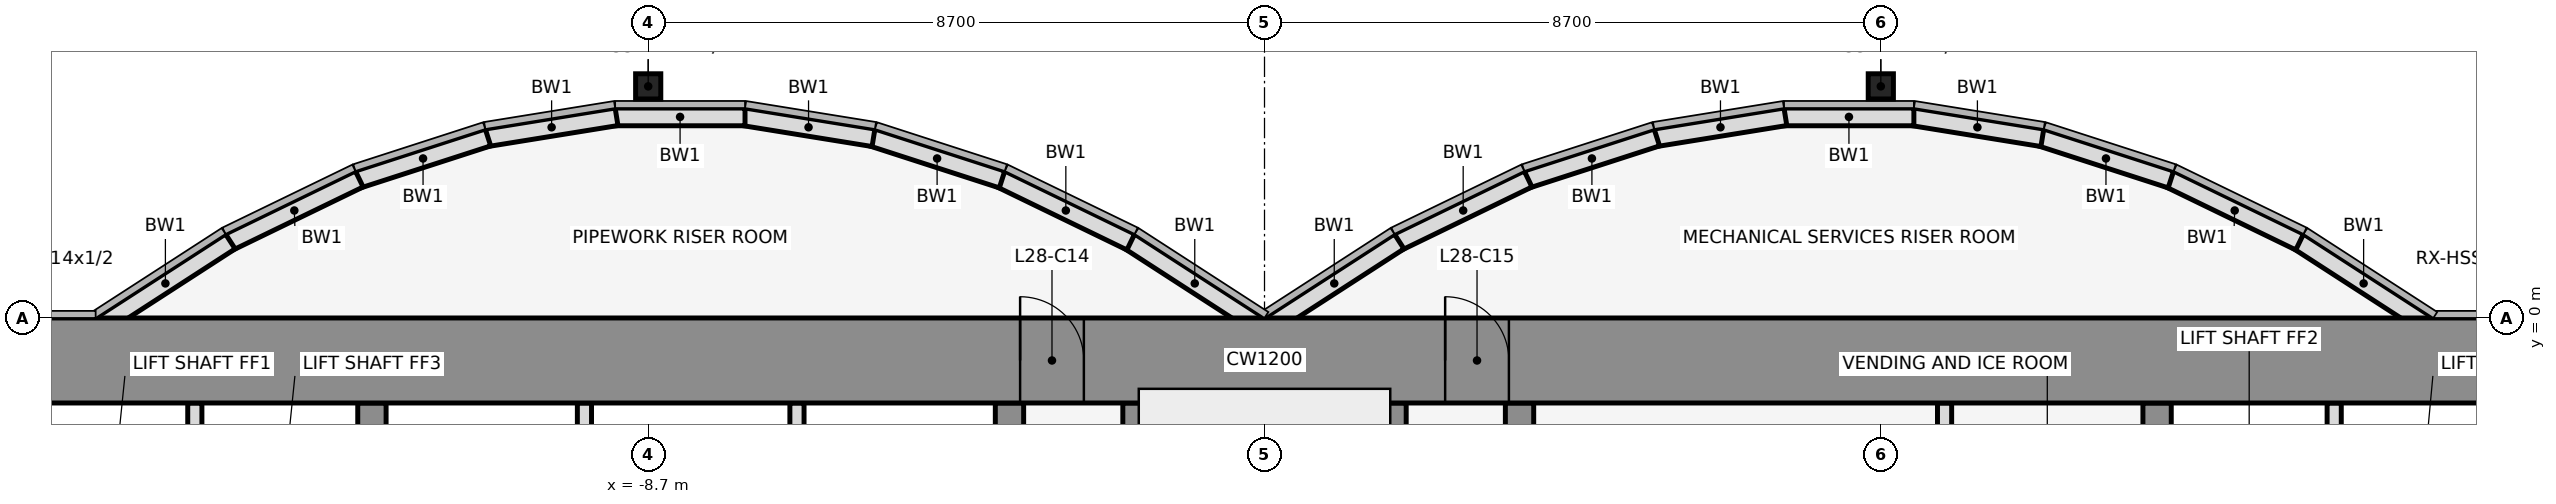
"""IFC4 building model, lengths in metres.
Left out: names, types, materials, properties, quantities, classifications, styles, units other than length and angle.
Written with IfcOpenShell. Run it as: python <this file> out.ifc"""

import sys

from ifc_helpers import new_model, si_unit, direction, frame, frame_2d, origin, origin_2d, place, context, subcontext, project, spatial, rectangle, hollow_rectangle, extrude, element, fill, save


model = new_model("IFC4")
c1 = context("Model", 3, precision=1e-05, world=origin(), true_north=direction((0.0, 1.0)))
c2 = subcontext(c1, "Body", "Model", "MODEL_VIEW")
j1 = project(units=[si_unit("LENGTHUNIT", "METRE"), si_unit("PLANEANGLEUNIT", "RADIAN")], contexts=[c1])
p1 = place(None, origin())
s1 = spatial("IfcSite", under=j1, at=p1, CompositionType="ELEMENT")
p2 = place(p1, origin())
s2 = spatial("IfcBuilding", under=s1, at=p2, CompositionType="ELEMENT")
p3 = place(p2, frame((0.0, 0.0, 130.9)))
s3 = spatial("IfcBuildingStorey", under=s2, at=p3, CompositionType="ELEMENT", Elevation=130.9)
for number, where, z_axis, x_axis in (
    (1, (-8.7, 3.269, 0.0), (0.0, 0.0, 1.0), (1.0, 0.0, 0.0)),
    (2, (8.7, 3.269, 0.0), (0.0, 0.0, 1.0), (1.0, 0.0, 0.0)),
):
    element("IfcColumn", number, at=place(p3, frame(where, z_axis=z_axis, x_axis=x_axis)), inside=s3, PredefinedType="COLUMN", context=c2, shape_type="SweptSolid", body=[
        extrude(hollow_rectangle(XDim=0.356, YDim=0.356, WallThickness=0.012, at=origin_2d()), origin(), (0.0, 0.0, 1.0), 4.1),
    ])
p4 = place(p3, frame((16.432, -0.105, 0.0), z_axis=(0.0, 0.0, 1.0), x_axis=(-0.83981312244, 0.542875602121, 0.0)))
e3 = element("IfcWall", 3, at=p4, inside=s3, PredefinedType="STANDARD", context=c2, shape_type="SweptSolid", body=[
    extrude(rectangle(XDim=2.183, YDim=0.25, at=frame_2d((1.091, 0.0))), origin(), (0.0, 0.0, 1.0), 3.9),
])
p5 = place(p3, frame((14.612, 1.073, 0.0), z_axis=(0.0, 0.0, 1.0), x_axis=(-0.89982408427, 0.436252928206, 0.0)))
e4 = element("IfcWall", 4, at=p5, inside=s3, PredefinedType="STANDARD", context=c2, shape_type="SweptSolid", body=[
    extrude(rectangle(XDim=2.038, YDim=0.25, at=frame_2d((1.019, 0.0))), origin(), (0.0, 0.0, 1.0), 3.9),
])
p6 = place(p3, frame((12.795, 1.955, 0.0), z_axis=(0.0, 0.0, 1.0), x_axis=(-0.951495806175, 0.307661714928, 0.0)))
e5 = element("IfcWall", 5, at=p6, inside=s3, PredefinedType="STANDARD", context=c2, shape_type="SweptSolid", body=[
    extrude(rectangle(XDim=1.927, YDim=0.25, at=frame_2d((0.963, 0.0))), origin(), (0.0, 0.0, 1.0), 3.9),
])
p7 = place(p3, frame((10.98, 2.543, 0.0), z_axis=(0.0, 0.0, 1.0), x_axis=(-0.987181718931, 0.159600293885, 0.0)))
e6 = element("IfcWall", 6, at=p7, inside=s3, PredefinedType="STANDARD", context=c2, shape_type="SweptSolid", body=[
    extrude(rectangle(XDim=1.857, YDim=0.25, at=frame_2d((0.929, 0.0))), origin(), (0.0, 0.0, 1.0), 3.9),
])
p8 = place(p3, frame((9.167, 2.838, 0.0), z_axis=(0.0, 0.0, 1.0), x_axis=(-1.0, 0.0, 0.0)))
e7 = element("IfcWall", 7, at=p8, inside=s3, PredefinedType="STANDARD", context=c2, shape_type="SweptSolid", body=[
    extrude(rectangle(XDim=1.833, YDim=0.25, at=frame_2d((0.917, 0.0))), origin(), (0.0, 0.0, 1.0), 3.9),
])
p9 = place(p3, frame((7.353, 2.84, 0.0), z_axis=(0.0, 0.0, 1.0), x_axis=(-0.987181718931, -0.159600293885, 0.0)))
e8 = element("IfcWall", 8, at=p9, inside=s3, PredefinedType="STANDARD", context=c2, shape_type="SweptSolid", body=[
    extrude(rectangle(XDim=1.857, YDim=0.25, at=frame_2d((0.929, 0.0))), origin(), (0.0, 0.0, 1.0), 3.9),
])
p10 = place(p3, frame((5.538, 2.548, 0.0), z_axis=(0.0, 0.0, 1.0), x_axis=(-0.951495806175, -0.307661714928, 0.0)))
e9 = element("IfcWall", 9, at=p10, inside=s3, PredefinedType="STANDARD", context=c2, shape_type="SweptSolid", body=[
    extrude(rectangle(XDim=1.927, YDim=0.25, at=frame_2d((0.963, 0.0))), origin(), (0.0, 0.0, 1.0), 3.9),
])
p11 = place(p3, frame((3.721, 1.962, 0.0), z_axis=(0.0, 0.0, 1.0), x_axis=(-0.89982408427, -0.436252928206, 0.0)))
e10 = element("IfcWall", 10, at=p11, inside=s3, PredefinedType="STANDARD", context=c2, shape_type="SweptSolid", body=[
    extrude(rectangle(XDim=2.038, YDim=0.25, at=frame_2d((1.019, 0.0))), origin(), (0.0, 0.0, 1.0), 3.9),
])
for number, where, z_axis, x_axis in (
    (11, (1.901, 1.08, 0.0), (0.0, 0.0, 1.0), (-0.84, -0.543, 0.0)),
    (12, (-0.068, -0.105, 0.0), (0.0, 0.0, 1.0), (-0.84, 0.543, 0.0)),
):
    element("IfcWall", number, at=place(p3, frame(where, z_axis=z_axis, x_axis=x_axis)), inside=s3, PredefinedType="STANDARD", context=c2, shape_type="SweptSolid", body=[
        extrude(rectangle(XDim=2.183, YDim=0.25, at=frame_2d((1.091, 0.0))), origin(), (0.0, 0.0, 1.0), 3.9),
    ])
p12 = place(p3, frame((-1.888, 1.073, 0.0), z_axis=(0.0, 0.0, 1.0), x_axis=(-0.89982408427, 0.436252928206, 0.0)))
e13 = element("IfcWall", 13, at=p12, inside=s3, PredefinedType="STANDARD", context=c2, shape_type="SweptSolid", body=[
    extrude(rectangle(XDim=2.038, YDim=0.25, at=frame_2d((1.019, 0.0))), origin(), (0.0, 0.0, 1.0), 3.9),
])
p13 = place(p3, frame((-3.705, 1.955, 0.0), z_axis=(0.0, 0.0, 1.0), x_axis=(-0.951495806175, 0.307661714928, 0.0)))
e14 = element("IfcWall", 14, at=p13, inside=s3, PredefinedType="STANDARD", context=c2, shape_type="SweptSolid", body=[
    extrude(rectangle(XDim=1.927, YDim=0.25, at=frame_2d((0.963, 0.0))), origin(), (0.0, 0.0, 1.0), 3.9),
])
p14 = place(p3, frame((-5.52, 2.543, 0.0), z_axis=(0.0, 0.0, 1.0), x_axis=(-0.987181718931, 0.159600293885, 0.0)))
e15 = element("IfcWall", 15, at=p14, inside=s3, PredefinedType="STANDARD", context=c2, shape_type="SweptSolid", body=[
    extrude(rectangle(XDim=1.857, YDim=0.25, at=frame_2d((0.929, 0.0))), origin(), (0.0, 0.0, 1.0), 3.9),
])
p15 = place(p3, frame((-7.333, 2.838, 0.0), z_axis=(0.0, 0.0, 1.0), x_axis=(-1.0, 0.0, 0.0)))
e16 = element("IfcWall", 16, at=p15, inside=s3, PredefinedType="STANDARD", context=c2, shape_type="SweptSolid", body=[
    extrude(rectangle(XDim=1.833, YDim=0.25, at=frame_2d((0.917, 0.0))), origin(), (0.0, 0.0, 1.0), 3.9),
])
p16 = place(p3, frame((-9.147, 2.84, 0.0), z_axis=(0.0, 0.0, 1.0), x_axis=(-0.987181718931, -0.159600293885, 0.0)))
e17 = element("IfcWall", 17, at=p16, inside=s3, PredefinedType="STANDARD", context=c2, shape_type="SweptSolid", body=[
    extrude(rectangle(XDim=1.857, YDim=0.25, at=frame_2d((0.929, 0.0))), origin(), (0.0, 0.0, 1.0), 3.9),
])
p17 = place(p3, frame((-10.962, 2.548, 0.0), z_axis=(0.0, 0.0, 1.0), x_axis=(-0.951495806175, -0.307661714928, 0.0)))
e18 = element("IfcWall", 18, at=p17, inside=s3, PredefinedType="STANDARD", context=c2, shape_type="SweptSolid", body=[
    extrude(rectangle(XDim=1.927, YDim=0.25, at=frame_2d((0.963, 0.0))), origin(), (0.0, 0.0, 1.0), 3.9),
])
p18 = place(p3, frame((-12.779, 1.962, 0.0), z_axis=(0.0, 0.0, 1.0), x_axis=(-0.89982408427, -0.436252928206, 0.0)))
e19 = element("IfcWall", 19, at=p18, inside=s3, PredefinedType="STANDARD", context=c2, shape_type="SweptSolid", body=[
    extrude(rectangle(XDim=2.038, YDim=0.25, at=frame_2d((1.019, 0.0))), origin(), (0.0, 0.0, 1.0), 3.9),
])
p19 = place(p3, frame((-14.599, 1.08, 0.0), z_axis=(0.0, 0.0, 1.0), x_axis=(-0.83981312244, -0.542875602121, 0.0)))
e20 = element("IfcWall", 20, at=p19, inside=s3, PredefinedType="STANDARD", context=c2, shape_type="SweptSolid", body=[
    extrude(rectangle(XDim=2.183, YDim=0.25, at=frame_2d((1.091, 0.0))), origin(), (0.0, 0.0, 1.0), 3.9),
])
p20 = place(p3, frame((-15.1, -4.6, 0.0), z_axis=(0.0, 0.0, 1.0), x_axis=(0.0, 1.0, 0.0)))
e21 = element("IfcWall", 21, at=p20, inside=s3, PredefinedType="PARTITIONING", context=c2, shape_type="SweptSolid", body=[
    extrude(rectangle(XDim=3.4, YDim=0.2, at=frame_2d((1.7, 0.0))), origin(), (0.0, 0.0, 1.0), 2.968),
])
p21 = place(p3, frame((-12.6, -11.8, 0.0), z_axis=(0.0, 0.0, 1.0), x_axis=(0.0, 1.0, 0.0)))
e22 = element("IfcWall", 22, at=p21, inside=s3, PredefinedType="SHEAR", context=c2, shape_type="SweptSolid", body=[
    extrude(rectangle(XDim=10.6, YDim=0.4, at=frame_2d((5.3, 0.0))), origin(), (0.0, 0.0, 1.0), 4.1),
])
p22 = place(p21, frame((4.75, 0.0, 0.0)))
e23 = element("IfcOpeningElement", 23, at=p22, cuts=e22, PredefinedType="OPENING", context=c2, shape_type="SweptSolid", body=[
    extrude(rectangle(XDim=1.1, YDim=2.1, at=frame_2d((0.55, 1.05))), frame((0.0, 0.212, 0.0), z_axis=(0.0, -1.0, 0.0), x_axis=(1.0, 0.0, 0.0)), (0.0, 0.0, 1.0), 0.424),
])
for number, where, z_axis, x_axis in (
    (24, (-9.6, -4.6, 0.0), (0.0, 0.0, 1.0), (0.0, 1.0, 0.0)),
    (25, (-6.6, -4.6, 0.0), (0.0, 0.0, 1.0), (0.0, 1.0, 0.0)),
):
    element("IfcWall", number, at=place(p3, frame(where, z_axis=z_axis, x_axis=x_axis)), inside=s3, PredefinedType="PARTITIONING", context=c2, shape_type="SweptSolid", body=[
        extrude(rectangle(XDim=3.4, YDim=0.2, at=frame_2d((1.7, 0.0))), origin(), (0.0, 0.0, 1.0), 2.968),
    ])
p23 = place(p3, frame((-3.6, -11.8, 0.0), z_axis=(0.0, 0.0, 1.0), x_axis=(0.0, 1.0, 0.0)))
e26 = element("IfcWall", 26, at=p23, inside=s3, PredefinedType="SHEAR", context=c2, shape_type="SweptSolid", body=[
    extrude(rectangle(XDim=10.6, YDim=0.4, at=frame_2d((5.3, 0.0))), origin(), (0.0, 0.0, 1.0), 4.1),
])
p24 = place(p23, frame((4.85, 0.0, 0.0)))
e27 = element("IfcOpeningElement", 27, at=p24, cuts=e26, PredefinedType="OPENING", context=c2, shape_type="SweptSolid", body=[
    extrude(rectangle(XDim=0.9, YDim=2.1, at=frame_2d((0.45, 1.05))), frame((0.0, 0.212, 0.0), z_axis=(0.0, -1.0, 0.0), x_axis=(1.0, 0.0, 0.0)), (0.0, 0.0, 1.0), 0.424),
])
for number, where, z_axis, x_axis in (
    (28, (-1.8, -11.8, 0.0), (0.0, 0.0, 1.0), (0.0, 1.0, 0.0)),
    (29, (1.8, -11.8, 0.0), (0.0, 0.0, 1.0), (0.0, 1.0, 0.0)),
):
    element("IfcWall", number, at=place(p3, frame(where, z_axis=z_axis, x_axis=x_axis)), inside=s3, PredefinedType="SHEAR", context=c2, shape_type="SweptSolid", body=[
        extrude(rectangle(XDim=10.6, YDim=0.4, at=frame_2d((5.3, 0.0))), origin(), (0.0, 0.0, 1.0), 4.1),
    ])
p25 = place(p3, frame((3.6, -11.8, 0.0), z_axis=(0.0, 0.0, 1.0), x_axis=(0.0, 1.0, 0.0)))
e30 = element("IfcWall", 30, at=p25, inside=s3, PredefinedType="SHEAR", context=c2, shape_type="SweptSolid", body=[
    extrude(rectangle(XDim=10.6, YDim=0.4, at=frame_2d((5.3, 0.0))), origin(), (0.0, 0.0, 1.0), 4.1),
])
p26 = place(p25, frame((1.35, 0.0, 0.0)))
e31 = element("IfcOpeningElement", 31, at=p26, cuts=e30, PredefinedType="OPENING", context=c2, shape_type="SweptSolid", body=[
    extrude(rectangle(XDim=0.9, YDim=2.1, at=frame_2d((0.45, 1.05))), frame((0.0, 0.212, 0.0), z_axis=(0.0, -1.0, 0.0), x_axis=(1.0, 0.0, 0.0)), (0.0, 0.0, 1.0), 0.424),
])
p27 = place(p3, frame((9.6, -4.6, 0.0), z_axis=(0.0, 0.0, 1.0), x_axis=(0.0, 1.0, 0.0)))
e32 = element("IfcWall", 32, at=p27, inside=s3, PredefinedType="PARTITIONING", context=c2, shape_type="SweptSolid", body=[
    extrude(rectangle(XDim=3.4, YDim=0.2, at=frame_2d((1.7, 0.0))), origin(), (0.0, 0.0, 1.0), 2.968),
])
p28 = place(p3, frame((12.6, -11.8, 0.0), z_axis=(0.0, 0.0, 1.0), x_axis=(0.0, 1.0, 0.0)))
e33 = element("IfcWall", 33, at=p28, inside=s3, PredefinedType="SHEAR", context=c2, shape_type="SweptSolid", body=[
    extrude(rectangle(XDim=10.6, YDim=0.4, at=frame_2d((5.3, 0.0))), origin(), (0.0, 0.0, 1.0), 4.1),
])
p29 = place(p28, frame((4.75, 0.0, 0.0)))
e34 = element("IfcOpeningElement", 34, at=p29, cuts=e33, PredefinedType="OPENING", context=c2, shape_type="SweptSolid", body=[
    extrude(rectangle(XDim=1.1, YDim=2.1, at=frame_2d((0.55, 1.05))), frame((0.0, 0.212, 0.0), z_axis=(0.0, -1.0, 0.0), x_axis=(1.0, 0.0, 0.0)), (0.0, 0.0, 1.0), 0.424),
])
p30 = place(p3, frame((15.1, -4.6, 0.0), z_axis=(0.0, 0.0, 1.0), x_axis=(0.0, 1.0, 0.0)))
e35 = element("IfcWall", 35, at=p30, inside=s3, PredefinedType="PARTITIONING", context=c2, shape_type="SweptSolid", body=[
    extrude(rectangle(XDim=3.4, YDim=0.2, at=frame_2d((1.7, 0.0))), origin(), (0.0, 0.0, 1.0), 2.968),
])
p31 = place(p3, frame((-22.0, -0.6, 0.0), z_axis=(0.0, 0.0, 1.0), x_axis=(1.0, 0.0, 0.0)))
e36 = element("IfcWall", 36, at=p31, inside=s3, PredefinedType="SHEAR", context=c2, shape_type="SweptSolid", body=[
    extrude(rectangle(XDim=44.0, YDim=1.2, at=frame_2d((22.0, 0.0))), origin(), (0.0, 0.0, 1.0), 4.1),
])
p32 = place(p31, frame((18.55, 0.0, 0.0)))
e37 = element("IfcOpeningElement", 37, at=p32, cuts=e36, PredefinedType="OPENING", context=c2, shape_type="SweptSolid", body=[
    extrude(rectangle(XDim=0.9, YDim=2.1, at=frame_2d((0.45, 1.05))), frame((0.0, 0.612, 0.0), z_axis=(0.0, -1.0, 0.0), x_axis=(1.0, 0.0, 0.0)), (0.0, 0.0, 1.0), 1.224),
])
p33 = place(p31, frame((24.55, 0.0, 0.0)))
e38 = element("IfcOpeningElement", 38, at=p33, cuts=e36, PredefinedType="OPENING", context=c2, shape_type="SweptSolid", body=[
    extrude(rectangle(XDim=0.9, YDim=2.1, at=frame_2d((0.45, 1.05))), frame((0.0, 0.612, 0.0), z_axis=(0.0, -1.0, 0.0), x_axis=(1.0, 0.0, 0.0)), (0.0, 0.0, 1.0), 1.224),
])
p34 = place(p32, origin())
e39 = element("IfcDoor", 39, at=p34, inside=s3, OperationType="SINGLE_SWING_LEFT", PredefinedType="DOOR", context=c2, shape_type="SweptSolid", body=[
    extrude(rectangle(XDim=0.9, YDim=2.1, at=frame_2d((0.45, 1.05))), frame((0.0, 0.025, 0.0), z_axis=(0.0, -1.0, 0.0), x_axis=(1.0, 0.0, 0.0)), (0.0, 0.0, 1.0), 0.05),
])
fill(e37, e39)
p35 = place(p33, origin())
e40 = element("IfcDoor", 40, at=p35, inside=s3, OperationType="SINGLE_SWING_LEFT", PredefinedType="DOOR", context=c2, shape_type="SweptSolid", body=[
    extrude(rectangle(XDim=0.9, YDim=2.1, at=frame_2d((0.45, 1.05))), frame((0.0, 0.025, 0.0), z_axis=(0.0, -1.0, 0.0), x_axis=(1.0, 0.0, 0.0)), (0.0, 0.0, 1.0), 0.05),
])
fill(e38, e40)
save(model, sys.argv[1])
